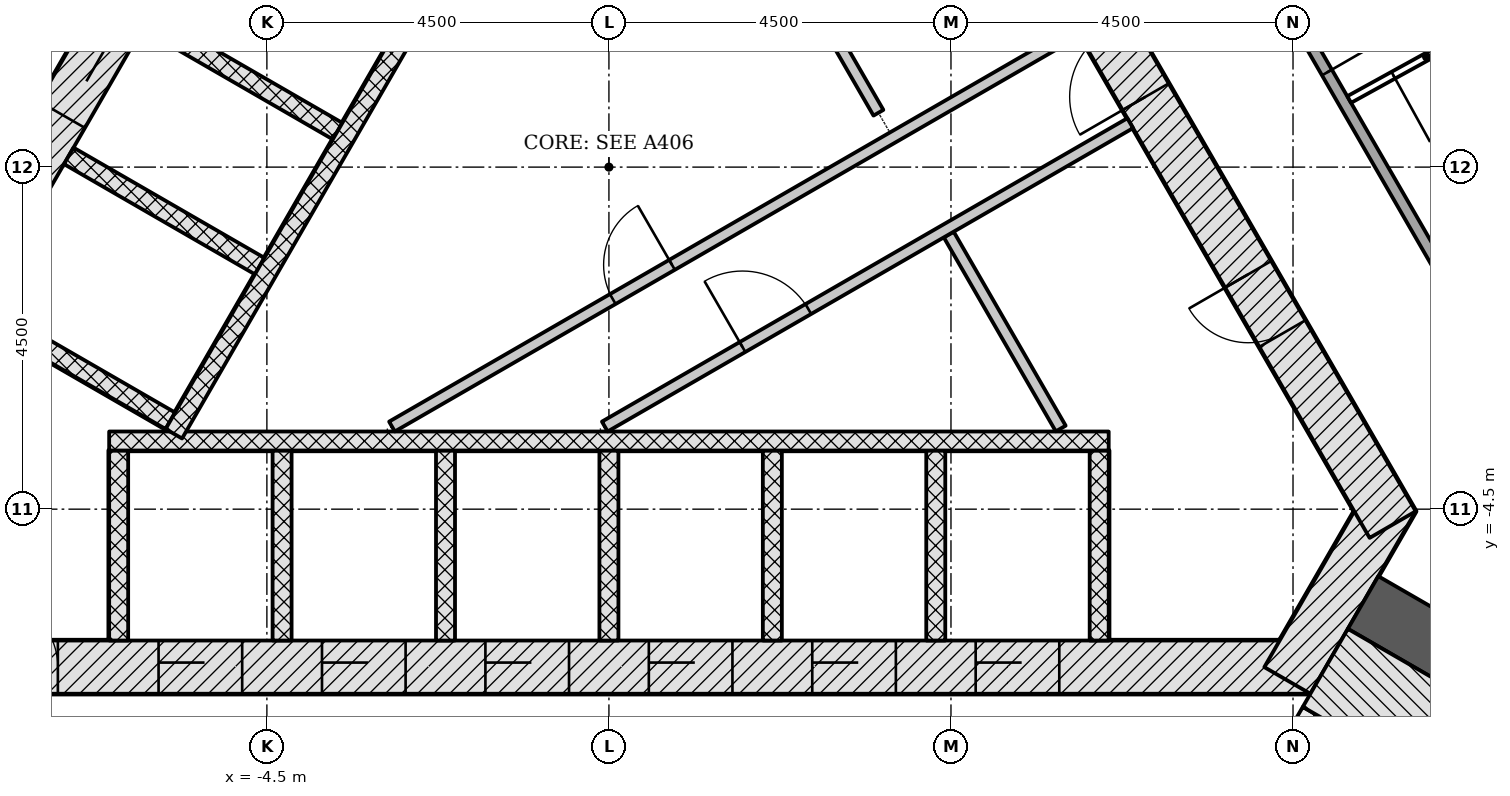
"""IFC4 building model, lengths in metres.
Left out: names, types, materials, properties, quantities, classifications, styles, units other than length and angle.
Written with IfcOpenShell. Run it as: python <this file> out.ifc"""

import sys

from ifc_helpers import new_model, si_unit, direction, frame, frame_2d, origin, place, context, subcontext, project, spatial, rectangle, extrude, element, fill, save


model = new_model("IFC4")
c1 = context("Model", 3, precision=1e-05, world=origin(), true_north=direction((0.0, 1.0)))
c2 = subcontext(c1, "Body", "Model", "MODEL_VIEW")
j1 = project(units=[si_unit("LENGTHUNIT", "METRE"), si_unit("PLANEANGLEUNIT", "RADIAN")], contexts=[c1])
p1 = place(None, origin())
s1 = spatial("IfcSite", under=j1, at=p1, CompositionType="ELEMENT")
p2 = place(p1, origin())
s2 = spatial("IfcBuilding", under=s1, at=p2, CompositionType="ELEMENT")
p3 = place(p2, frame((0.0, 0.0, 98.7)))
s3 = spatial("IfcBuildingStorey", under=s2, at=p3, CompositionType="ELEMENT", Elevation=98.7)
p4 = place(p3, frame((-9.229, -6.578, -0.2), z_axis=(0.0, 0.0, 1.0), x_axis=(1.0, 0.0, 0.0)))
e1 = element("IfcWall", 1, at=p4, inside=s3, PredefinedType="SHEAR", context=c2, shape_type="SweptSolid", body=[
    extrude(rectangle(XDim=18.458, YDim=0.7, at=frame_2d((9.229, 0.0))), origin(), (0.0, 0.0, 1.0), 3.6),
])
p5 = place(p4, frame((3.304, 0.0, 0.2)))
e2 = element("IfcOpeningElement", 2, at=p5, cuts=e1, PredefinedType="OPENING", context=c2, shape_type="SweptSolid", body=[
    extrude(rectangle(XDim=1.1, YDim=2.1, at=frame_2d((0.55, 1.05))), frame((0.0, 0.36, 0.0), z_axis=(0.0, -1.0, 0.0), x_axis=(1.0, 0.0, 0.0)), (0.0, 0.0, 1.0), 0.72),
])
p6 = place(p4, frame((5.454, 0.0, 0.2)))
e3 = element("IfcOpeningElement", 3, at=p6, cuts=e1, PredefinedType="OPENING", context=c2, shape_type="SweptSolid", body=[
    extrude(rectangle(XDim=1.1, YDim=2.1, at=frame_2d((0.55, 1.05))), frame((0.0, 0.36, 0.0), z_axis=(0.0, -1.0, 0.0), x_axis=(1.0, 0.0, 0.0)), (0.0, 0.0, 1.0), 0.72),
])
p7 = place(p4, frame((7.604, 0.0, 0.2)))
e4 = element("IfcOpeningElement", 4, at=p7, cuts=e1, PredefinedType="OPENING", context=c2, shape_type="SweptSolid", body=[
    extrude(rectangle(XDim=1.1, YDim=2.1, at=frame_2d((0.55, 1.05))), frame((0.0, 0.36, 0.0), z_axis=(0.0, -1.0, 0.0), x_axis=(1.0, 0.0, 0.0)), (0.0, 0.0, 1.0), 0.72),
])
p8 = place(p4, frame((9.754, 0.0, 0.2)))
e5 = element("IfcOpeningElement", 5, at=p8, cuts=e1, PredefinedType="OPENING", context=c2, shape_type="SweptSolid", body=[
    extrude(rectangle(XDim=1.1, YDim=2.1, at=frame_2d((0.55, 1.05))), frame((0.0, 0.36, 0.0), z_axis=(0.0, -1.0, 0.0), x_axis=(1.0, 0.0, 0.0)), (0.0, 0.0, 1.0), 0.72),
])
p9 = place(p4, frame((11.904, 0.0, 0.2)))
e6 = element("IfcOpeningElement", 6, at=p9, cuts=e1, PredefinedType="OPENING", context=c2, shape_type="SweptSolid", body=[
    extrude(rectangle(XDim=1.1, YDim=2.1, at=frame_2d((0.55, 1.05))), frame((0.0, 0.36, 0.0), z_axis=(0.0, -1.0, 0.0), x_axis=(1.0, 0.0, 0.0)), (0.0, 0.0, 1.0), 0.72),
])
p10 = place(p4, frame((14.054, 0.0, 0.2)))
e7 = element("IfcOpeningElement", 7, at=p10, cuts=e1, PredefinedType="OPENING", context=c2, shape_type="SweptSolid", body=[
    extrude(rectangle(XDim=1.1, YDim=2.1, at=frame_2d((0.55, 1.05))), frame((0.0, 0.36, 0.0), z_axis=(0.0, -1.0, 0.0), x_axis=(1.0, 0.0, 0.0)), (0.0, 0.0, 1.0), 0.72),
])
p11 = place(p4, frame((1.079, 0.0, 0.2)))
e8 = element("IfcOpeningElement", 8, at=p11, cuts=e1, PredefinedType="OPENING", context=c2, shape_type="SweptSolid", body=[
    extrude(rectangle(XDim=0.9, YDim=2.1, at=frame_2d((0.45, 1.05))), frame((0.0, 0.36, 0.0), z_axis=(0.0, -1.0, 0.0), x_axis=(1.0, 0.0, 0.0)), (0.0, 0.0, 1.0), 0.72),
])
p12 = place(p3, frame((8.926, -6.753, -0.2), z_axis=(0.0, 0.0, 1.0), x_axis=(0.500042739161, 0.866000726912, 0.0)))
e9 = element("IfcWall", 9, at=p12, inside=s3, PredefinedType="SHEAR", context=c2, shape_type="SweptSolid", body=[
    extrude(rectangle(XDim=2.771, YDim=0.7, at=frame_2d((1.386, 0.0))), origin(), (0.0, 0.0, 1.0), 3.6),
])
p13 = place(p3, frame((10.311, -4.703, -0.2), z_axis=(0.0, 0.0, 1.0), x_axis=(-0.500001446645, 0.866024568562, 0.0)))
e10 = element("IfcWall", 10, at=p13, inside=s3, PredefinedType="SHEAR", context=c2, shape_type="SweptSolid", body=[
    extrude(rectangle(XDim=18.458, YDim=0.7, at=frame_2d((9.229, 0.0))), origin(), (0.0, 0.0, 1.0), 3.6),
])
p14 = place(p13, frame((6.5, 0.0, 0.2)))
e11 = element("IfcOpeningElement", 11, at=p14, cuts=e10, PredefinedType="OPENING", context=c2, shape_type="SweptSolid", body=[
    extrude(rectangle(XDim=1.0, YDim=2.1, at=frame_2d((0.5, 1.05))), frame((0.0, 0.36, 0.0), z_axis=(0.0, -1.0, 0.0), x_axis=(1.0, 0.0, 0.0)), (0.0, 0.0, 1.0), 0.72),
])
p15 = place(p13, frame((2.902, 0.0, 0.2)))
e12 = element("IfcOpeningElement", 12, at=p15, cuts=e10, PredefinedType="OPENING", context=c2, shape_type="SweptSolid", body=[
    extrude(rectangle(XDim=0.9, YDim=2.1, at=frame_2d((0.45, 1.05))), frame((0.0, 0.36, 0.0), z_axis=(0.0, -1.0, 0.0), x_axis=(1.0, 0.0, 0.0)), (0.0, 0.0, 1.0), 0.72),
])
p16 = place(p13, frame((8.75, 0.0, 0.2)))
e13 = element("IfcOpeningElement", 13, at=p16, cuts=e10, PredefinedType="OPENING", context=c2, shape_type="SweptSolid", body=[
    extrude(rectangle(XDim=1.0, YDim=2.1, at=frame_2d((0.5, 1.05))), frame((0.0, 0.36, 0.0), z_axis=(0.0, -1.0, 0.0), x_axis=(1.0, 0.0, 0.0)), (0.0, 0.0, 1.0), 0.72),
])
p17 = place(p13, frame((13.977, 0.0, 0.2)))
e14 = element("IfcOpeningElement", 14, at=p17, cuts=e10, PredefinedType="OPENING", context=c2, shape_type="SweptSolid", body=[
    extrude(rectangle(XDim=0.9, YDim=2.1, at=frame_2d((0.45, 1.05))), frame((0.0, 0.36, 0.0), z_axis=(0.0, -1.0, 0.0), x_axis=(1.0, 0.0, 0.0)), (0.0, 0.0, 1.0), 0.72),
])
p18 = place(p3, frame((-1.083, 11.281, -0.2), z_axis=(0.0, 0.0, 1.0), x_axis=(-0.500001446645, -0.866024568562, 0.0)))
e15 = element("IfcWall", 15, at=p18, inside=s3, PredefinedType="SHEAR", context=c2, shape_type="SweptSolid", body=[
    extrude(rectangle(XDim=18.458, YDim=0.7, at=frame_2d((9.229, 0.0))), origin(), (0.0, 0.0, 1.0), 3.6),
])
p19 = place(p18, frame((8.979, 0.0, 0.2)))
e16 = element("IfcOpeningElement", 16, at=p19, cuts=e15, PredefinedType="OPENING", context=c2, shape_type="SweptSolid", body=[
    extrude(rectangle(XDim=1.2, YDim=2.1, at=frame_2d((0.6, 1.05))), frame((0.0, 0.36, 0.0), z_axis=(0.0, -1.0, 0.0), x_axis=(1.0, 0.0, 0.0)), (0.0, 0.0, 1.0), 0.72),
])
p20 = place(p18, frame((11.029, 0.0, 0.2)))
e17 = element("IfcOpeningElement", 17, at=p20, cuts=e15, PredefinedType="OPENING", context=c2, shape_type="SweptSolid", body=[
    extrude(rectangle(XDim=1.2, YDim=2.1, at=frame_2d((0.6, 1.05))), frame((0.0, 0.36, 0.0), z_axis=(0.0, -1.0, 0.0), x_axis=(1.0, 0.0, 0.0)), (0.0, 0.0, 1.0), 0.72),
])
p21 = place(p3, frame((9.922, -5.728, -0.2), z_axis=(0.0, 0.0, 1.0), x_axis=(0.866029086277, -0.499993621681, 0.0)))
e18 = element("IfcWall", 18, at=p21, inside=s3, PredefinedType="SHEAR", context=c2, shape_type="SweptSolid", body=[
    extrude(rectangle(XDim=12.677, YDim=0.8, at=frame_2d((6.339, 0.0))), origin(), (0.0, 0.0, 1.0), 3.6),
])
for number, where, z_axis, x_axis in (
    (19, (-6.45, -6.228, -0.2), (0.0, 0.0, 1.0), (0.0, 1.0, 0.0)),
    (20, (-4.3, -6.228, -0.2), (0.0, 0.0, 1.0), (0.0, 1.0, 0.0)),
    (21, (-2.15, -6.228, -0.2), (0.0, 0.0, 1.0), (0.0, 1.0, 0.0)),
    (22, (0.0, -6.228, -0.2), (0.0, 0.0, 1.0), (0.0, 1.0, 0.0)),
    (23, (2.15, -6.228, -0.2), (0.0, 0.0, 1.0), (0.0, 1.0, 0.0)),
    (24, (4.3, -6.228, -0.2), (0.0, 0.0, 1.0), (0.0, 1.0, 0.0)),
    (25, (6.45, -6.228, -0.2), (0.0, 0.0, 1.0), (0.0, 1.0, 0.0)),
):
    element("IfcWall", number, at=place(p3, frame(where, z_axis=z_axis, x_axis=x_axis)), inside=s3, PredefinedType="PARTITIONING", context=c2, shape_type="SweptSolid", body=[
        extrude(rectangle(XDim=2.5, YDim=0.25, at=frame_2d((1.25, 0.0))), origin(), (0.0, 0.0, 1.0), 3.6),
    ])
p22 = place(p3, frame((-6.575, -3.603, 0.0), z_axis=(0.0, 0.0, 1.0), x_axis=(1.0, 0.0, 0.0)))
e26 = element("IfcWall", 26, at=p22, inside=s3, PredefinedType="PARTITIONING", context=c2, shape_type="SweptSolid", body=[
    extrude(rectangle(XDim=13.15, YDim=0.25, at=frame_2d((6.575, 0.0))), origin(), (0.0, 0.0, 1.0), 3.4),
])
for number, where, z_axis, x_axis in (
    (27, (-6.081, 1.923, -0.2), (0.0, 0.0, 1.0), (0.866, -0.5, 0.0)),
    (28, (-7.106, 0.148, -0.2), (0.0, 0.0, 1.0), (0.866, -0.5, 0.0)),
    (29, (-8.281, -1.887, -0.2), (0.0, 0.0, 1.0), (0.866, -0.5, 0.0)),
):
    element("IfcWall", number, at=place(p3, frame(where, z_axis=z_axis, x_axis=x_axis)), inside=s3, PredefinedType="PARTITIONING", context=c2, shape_type="SweptSolid", body=[
        extrude(rectangle(XDim=2.9, YDim=0.25, at=frame_2d((1.45, 0.0))), origin(), (0.0, 0.0, 1.0), 3.6),
    ])
p23 = place(p3, frame((0.176, 6.711, 0.0), z_axis=(0.0, 0.0, 1.0), x_axis=(-0.500004227369, -0.866022963098, 0.0)))
e30 = element("IfcWall", 30, at=p23, inside=s3, PredefinedType="PARTITIONING", context=c2, shape_type="SweptSolid", body=[
    extrude(rectangle(XDim=11.8, YDim=0.25, at=frame_2d((5.9, 0.0))), origin(), (0.0, 0.0, 1.0), 3.4),
])
p24 = place(p3, frame((-2.854, -3.413, 0.0), z_axis=(0.0, 0.0, 1.0), x_axis=(0.866030102318, 0.499991861813, 0.0)))
e31 = element("IfcWall", 31, at=p24, inside=s3, PredefinedType="PARTITIONING", context=c2, shape_type="SweptSolid", body=[
    extrude(rectangle(XDim=10.407, YDim=0.15, at=frame_2d((5.204, 0.0))), origin(), (0.0, 0.0, 1.0), 3.4),
])
p25 = place(p24, frame((3.354, 0.0, 0.0)))
e32 = element("IfcOpeningElement", 32, at=p25, cuts=e31, PredefinedType="OPENING", context=c2, shape_type="SweptSolid", body=[
    extrude(rectangle(XDim=0.9, YDim=2.1, at=frame_2d((0.45, 1.05))), frame((0.0, 0.085, 0.0), z_axis=(0.0, -1.0, 0.0), x_axis=(1.0, 0.0, 0.0)), (0.0, 0.0, 1.0), 0.17),
])
p26 = place(p3, frame((5.944, -3.439, 0.0), z_axis=(0.0, 0.0, 1.0), x_axis=(-0.499997367627, 0.86602692358, 0.0)))
e33 = element("IfcWall", 33, at=p26, inside=s3, PredefinedType="PARTITIONING", context=c2, shape_type="SweptSolid", body=[
    extrude(rectangle(XDim=2.947, YDim=0.15, at=frame_2d((1.473, 0.0))), origin(), (0.0, 0.0, 1.0), 3.4),
])
p27 = place(p3, frame((-0.054, -3.413, 0.0), z_axis=(0.0, 0.0, 1.0), x_axis=(0.866026668906, 0.499997808738, 0.0)))
e34 = element("IfcWall", 34, at=p27, inside=s3, PredefinedType="PARTITIONING", context=c2, shape_type="SweptSolid", body=[
    extrude(rectangle(XDim=7.982, YDim=0.15, at=frame_2d((3.991, 0.0))), origin(), (0.0, 0.0, 1.0), 3.4),
])
p28 = place(p27, frame((2.092, 0.0, 0.0)))
e35 = element("IfcOpeningElement", 35, at=p28, cuts=e34, PredefinedType="OPENING", context=c2, shape_type="SweptSolid", body=[
    extrude(rectangle(XDim=1.0, YDim=2.1, at=frame_2d((0.5, 1.05))), frame((0.0, 0.085, 0.0), z_axis=(0.0, -1.0, 0.0), x_axis=(1.0, 0.0, 0.0)), (0.0, 0.0, 1.0), 0.17),
])
p29 = place(p3, frame((3.546, 0.715, 0.0), z_axis=(0.0, 0.0, 1.0), x_axis=(-0.50002895357, 0.866008686788, 0.0)))
e36 = element("IfcWall", 36, at=p29, inside=s3, PredefinedType="PARTITIONING", context=c2, shape_type="SweptSolid", body=[
    extrude(rectangle(XDim=6.642, YDim=0.15, at=frame_2d((3.321, 0.0))), origin(), (0.0, 0.0, 1.0), 3.4),
])
p30 = place(p3, frame((7.44, -10.226, -0.2), z_axis=(0.0, 0.0, 1.0), x_axis=(0.500022077904, 0.866012656725, 0.0)))
e37 = element("IfcWall", 37, at=p30, inside=s3, PredefinedType="SHEAR", context=c2, shape_type="SweptSolid", body=[
    extrude(rectangle(XDim=3.55, YDim=0.2, at=frame_2d((1.775, 0.0))), origin(), (0.0, 0.0, 1.0), 3.6),
])
p31 = place(p30, frame((1.175, 0.0, 0.2)))
e38 = element("IfcOpeningElement", 38, at=p31, cuts=e37, PredefinedType="OPENING", context=c2, shape_type="SweptSolid", body=[
    extrude(rectangle(XDim=1.2, YDim=2.1, at=frame_2d((0.6, 1.05))), frame((0.0, 0.11, 0.0), z_axis=(0.0, -1.0, 0.0), x_axis=(1.0, 0.0, 0.0)), (0.0, 0.0, 1.0), 0.22),
])
p32 = place(p3, frame((9.425, -6.588, -0.2), z_axis=(0.0, 0.0, 1.0), x_axis=(0.866018442252, -0.500012057535, 0.0)))
e39 = element("IfcWall", 39, at=p32, inside=s3, PredefinedType="SHEAR", context=c2, shape_type="SweptSolid", body=[
    extrude(rectangle(XDim=7.2, YDim=1.186, at=frame_2d((3.6, 0.0))), origin(), (0.0, 0.0, 1.0), 3.6),
])
p33 = place(p3, frame((-16.169, -3.099, 0.0), z_axis=(0.0, 0.0, 1.0), x_axis=(0.499999805269, 0.866025516212, 0.0)))
e40 = element("IfcWall", 40, at=p33, inside=s3, PredefinedType="PARTITIONING", context=c2, shape_type="SweptSolid", body=[
    extrude(rectangle(XDim=22.097, YDim=0.15, at=frame_2d((11.049, 0.0))), origin(), (0.0, 0.0, 1.0), 2.778),
])
p34 = place(p33, frame((16.878, 0.0, 0.0)))
e41 = element("IfcOpeningElement", 41, at=p34, cuts=e40, PredefinedType="OPENING", context=c2, shape_type="SweptSolid", body=[
    extrude(rectangle(XDim=1.0, YDim=2.1, at=frame_2d((0.5, 1.05))), frame((0.0, 0.085, 0.0), z_axis=(0.0, -1.0, 0.0), x_axis=(1.0, 0.0, 0.0)), (0.0, 0.0, 1.0), 0.17),
])
p35 = place(p33, frame((7.816, 0.0, 0.0)))
e42 = element("IfcOpeningElement", 42, at=p35, cuts=e40, PredefinedType="OPENING", context=c2, shape_type="SweptSolid", body=[
    extrude(rectangle(XDim=1.5, YDim=2.1, at=frame_2d((0.75, 1.05))), frame((0.0, 0.085, 0.0), z_axis=(0.0, -1.0, 0.0), x_axis=(1.0, 0.0, 0.0)), (0.0, 0.0, 1.0), 0.17),
])
p36 = place(p33, frame((1.2, 0.0, 0.0)))
e43 = element("IfcOpeningElement", 43, at=p36, cuts=e40, PredefinedType="OPENING", context=c2, shape_type="SweptSolid", body=[
    extrude(rectangle(XDim=1.5, YDim=2.1, at=frame_2d((0.75, 1.05))), frame((0.0, 0.085, 0.0), z_axis=(0.0, -1.0, 0.0), x_axis=(1.0, 0.0, 0.0)), (0.0, 0.0, 1.0), 0.17),
])
p37 = place(p3, frame((-4.407, 13.374, 0.0), z_axis=(0.0, 0.0, 1.0), x_axis=(-0.499997181693, -0.866027030928, 0.0)))
e44 = element("IfcWall", 44, at=p37, inside=s3, PredefinedType="PARTITIONING", context=c2, shape_type="SweptSolid", body=[
    extrude(rectangle(XDim=16.77, YDim=0.15, at=frame_2d((8.385, 0.0))), origin(), (0.0, 0.0, 1.0), 2.778),
])
p38 = place(p37, frame((8.879, 0.0, 0.0)))
e45 = element("IfcOpeningElement", 45, at=p38, cuts=e44, PredefinedType="OPENING", context=c2, shape_type="SweptSolid", body=[
    extrude(rectangle(XDim=1.0, YDim=2.1, at=frame_2d((0.5, 1.05))), frame((0.0, 0.085, 0.0), z_axis=(0.0, -1.0, 0.0), x_axis=(1.0, 0.0, 0.0)), (0.0, 0.0, 1.0), 0.17),
])
p39 = place(p3, frame((5.289, 8.446, 0.0), z_axis=(0.0, 0.0, 1.0), x_axis=(0.499996620721, -0.866027354803, 0.0)))
e46 = element("IfcWall", 46, at=p39, inside=s3, PredefinedType="PARTITIONING", context=c2, shape_type="SweptSolid", body=[
    extrude(rectangle(XDim=15.057, YDim=0.15, at=frame_2d((7.528, 0.0))), origin(), (0.0, 0.0, 1.0), 2.778),
])
p40 = place(p39, frame((12.566, 0.0, 0.0)))
e47 = element("IfcOpeningElement", 47, at=p40, cuts=e46, PredefinedType="OPENING", context=c2, shape_type="SweptSolid", body=[
    extrude(rectangle(XDim=1.0, YDim=2.1, at=frame_2d((0.5, 1.05))), frame((0.0, 0.085, 0.0), z_axis=(0.0, -1.0, 0.0), x_axis=(1.0, 0.0, 0.0)), (0.0, 0.0, 1.0), 0.17),
])
p41 = place(p39, frame((7.316, 0.0, 0.0)))
e48 = element("IfcOpeningElement", 48, at=p41, cuts=e46, PredefinedType="OPENING", context=c2, shape_type="SweptSolid", body=[
    extrude(rectangle(XDim=1.0, YDim=2.1, at=frame_2d((0.5, 1.05))), frame((0.0, 0.085, 0.0), z_axis=(0.0, -1.0, 0.0), x_axis=(1.0, 0.0, 0.0)), (0.0, 0.0, 1.0), 0.17),
])
p42 = place(p39, frame((5.357, 0.0, 0.0)))
e49 = element("IfcOpeningElement", 49, at=p42, cuts=e46, PredefinedType="OPENING", context=c2, shape_type="SweptSolid", body=[
    extrude(rectangle(XDim=1.0, YDim=2.1, at=frame_2d((0.5, 1.05))), frame((0.0, 0.085, 0.0), z_axis=(0.0, -1.0, 0.0), x_axis=(1.0, 0.0, 0.0)), (0.0, 0.0, 1.0), 0.17),
])
p43 = place(p3, frame((11.808, 2.03, 0.0), z_axis=(0.0, 0.0, 1.0), x_axis=(-0.875678647011, -0.482894302275, 0.0)))
e50 = element("IfcWall", 50, at=p43, inside=s3, PredefinedType="PARTITIONING", context=c2, shape_type="SweptSolid", body=[
    extrude(rectangle(XDim=2.363, YDim=0.1, at=frame_2d((1.181, 0.0))), origin(), (0.0, 0.0, 1.0), 3.4),
])
p44 = place(p43, frame((0.7, 0.0, 0.0)))
e51 = element("IfcOpeningElement", 51, at=p44, cuts=e50, PredefinedType="OPENING", context=c2, shape_type="SweptSolid", body=[
    extrude(rectangle(XDim=1.0, YDim=2.1, at=frame_2d((0.5, 1.05))), frame((0.0, 0.06, 0.0), z_axis=(0.0, -1.0, 0.0), x_axis=(1.0, 0.0, 0.0)), (0.0, 0.0, 1.0), 0.12),
])
p45 = place(p5, origin())
e52 = element("IfcDoor", 52, at=p45, inside=s3, OperationType="DOUBLE_DOOR_SLIDING", PredefinedType="DOOR", context=c2, shape_type="SweptSolid", body=[
    extrude(rectangle(XDim=1.1, YDim=2.1, at=frame_2d((0.55, 1.05))), frame((0.0, 0.025, 0.0), z_axis=(0.0, -1.0, 0.0), x_axis=(1.0, 0.0, 0.0)), (0.0, 0.0, 1.0), 0.05),
])
fill(e2, e52)
p46 = place(p6, origin())
e53 = element("IfcDoor", 53, at=p46, inside=s3, OperationType="DOUBLE_DOOR_SLIDING", PredefinedType="DOOR", context=c2, shape_type="SweptSolid", body=[
    extrude(rectangle(XDim=1.1, YDim=2.1, at=frame_2d((0.55, 1.05))), frame((0.0, 0.025, 0.0), z_axis=(0.0, -1.0, 0.0), x_axis=(1.0, 0.0, 0.0)), (0.0, 0.0, 1.0), 0.05),
])
fill(e3, e53)
p47 = place(p7, origin())
e54 = element("IfcDoor", 54, at=p47, inside=s3, OperationType="DOUBLE_DOOR_SLIDING", PredefinedType="DOOR", context=c2, shape_type="SweptSolid", body=[
    extrude(rectangle(XDim=1.1, YDim=2.1, at=frame_2d((0.55, 1.05))), frame((0.0, 0.025, 0.0), z_axis=(0.0, -1.0, 0.0), x_axis=(1.0, 0.0, 0.0)), (0.0, 0.0, 1.0), 0.05),
])
fill(e4, e54)
p48 = place(p8, origin())
e55 = element("IfcDoor", 55, at=p48, inside=s3, OperationType="DOUBLE_DOOR_SLIDING", PredefinedType="DOOR", context=c2, shape_type="SweptSolid", body=[
    extrude(rectangle(XDim=1.1, YDim=2.1, at=frame_2d((0.55, 1.05))), frame((0.0, 0.025, 0.0), z_axis=(0.0, -1.0, 0.0), x_axis=(1.0, 0.0, 0.0)), (0.0, 0.0, 1.0), 0.05),
])
fill(e5, e55)
p49 = place(p9, origin())
e56 = element("IfcDoor", 56, at=p49, inside=s3, OperationType="DOUBLE_DOOR_SLIDING", PredefinedType="DOOR", context=c2, shape_type="SweptSolid", body=[
    extrude(rectangle(XDim=1.1, YDim=2.1, at=frame_2d((0.55, 1.05))), frame((0.0, 0.025, 0.0), z_axis=(0.0, -1.0, 0.0), x_axis=(1.0, 0.0, 0.0)), (0.0, 0.0, 1.0), 0.05),
])
fill(e6, e56)
p50 = place(p10, origin())
e57 = element("IfcDoor", 57, at=p50, inside=s3, OperationType="DOUBLE_DOOR_SLIDING", PredefinedType="DOOR", context=c2, shape_type="SweptSolid", body=[
    extrude(rectangle(XDim=1.1, YDim=2.1, at=frame_2d((0.55, 1.05))), frame((0.0, 0.025, 0.0), z_axis=(0.0, -1.0, 0.0), x_axis=(1.0, 0.0, 0.0)), (0.0, 0.0, 1.0), 0.05),
])
fill(e7, e57)
p51 = place(p20, origin())
e58 = element("IfcDoor", 58, at=p51, inside=s3, OperationType="DOUBLE_DOOR_SLIDING", PredefinedType="DOOR", context=c2, shape_type="SweptSolid", body=[
    extrude(rectangle(XDim=1.2, YDim=2.1, at=frame_2d((0.6, 1.05))), frame((0.0, 0.025, 0.0), z_axis=(0.0, -1.0, 0.0), x_axis=(1.0, 0.0, 0.0)), (0.0, 0.0, 1.0), 0.05),
])
fill(e17, e58)
p52 = place(p14, origin())
e59 = element("IfcDoor", 59, at=p52, inside=s3, OperationType="SINGLE_SWING_LEFT", PredefinedType="DOOR", context=c2, shape_type="SweptSolid", body=[
    extrude(rectangle(XDim=1.0, YDim=2.1, at=frame_2d((0.5, 1.05))), frame((0.0, 0.075, 0.0), z_axis=(0.0, -1.0, 0.0), x_axis=(1.0, 0.0, 0.0)), (0.0, 0.0, 1.0), 0.15),
])
fill(e11, e59)
p53 = place(p15, origin())
e60 = element("IfcDoor", 60, at=p53, inside=s3, OperationType="SINGLE_SWING_RIGHT", PredefinedType="DOOR", context=c2, shape_type="SweptSolid", body=[
    extrude(rectangle(XDim=0.9, YDim=2.1, at=frame_2d((0.45, 1.05))), frame((0.0, 0.075, 0.0), z_axis=(0.0, -1.0, 0.0), x_axis=(1.0, 0.0, 0.0)), (0.0, 0.0, 1.0), 0.15),
])
fill(e12, e60)
p54 = place(p28, origin())
e61 = element("IfcDoor", 61, at=p54, inside=s3, OperationType="SINGLE_SWING_LEFT", PredefinedType="DOOR", context=c2, shape_type="SweptSolid", body=[
    extrude(rectangle(XDim=1.0, YDim=2.1, at=frame_2d((0.5, 1.05))), frame((0.0, 0.025, 0.0), z_axis=(0.0, -1.0, 0.0), x_axis=(1.0, 0.0, 0.0)), (0.0, 0.0, 1.0), 0.05),
])
fill(e35, e61)
p55 = place(p25, origin())
e62 = element("IfcDoor", 62, at=p55, inside=s3, OperationType="SINGLE_SWING_RIGHT", PredefinedType="DOOR", context=c2, shape_type="SweptSolid", body=[
    extrude(rectangle(XDim=0.9, YDim=2.1, at=frame_2d((0.45, 1.05))), frame((0.0, 0.025, 0.0), z_axis=(0.0, -1.0, 0.0), x_axis=(1.0, 0.0, 0.0)), (0.0, 0.0, 1.0), 0.05),
])
fill(e32, e62)
p56 = place(p11, origin())
e63 = element("IfcDoor", 63, at=p56, inside=s3, OperationType="SINGLE_SWING_LEFT", PredefinedType="DOOR", context=c2, shape_type="SweptSolid", body=[
    extrude(rectangle(XDim=0.9, YDim=2.1, at=frame_2d((0.45, 1.05))), frame((0.0, 0.075, 0.0), z_axis=(0.0, -1.0, 0.0), x_axis=(1.0, 0.0, 0.0)), (0.0, 0.0, 1.0), 0.15),
])
fill(e8, e63)
p57 = place(p41, origin())
e64 = element("IfcDoor", 64, at=p57, inside=s3, OperationType="SINGLE_SWING_RIGHT", PredefinedType="DOOR", context=c2, shape_type="SweptSolid", body=[
    extrude(rectangle(XDim=1.0, YDim=2.1, at=frame_2d((0.5, 1.05))), frame((0.0, 0.025, 0.0), z_axis=(0.0, -1.0, 0.0), x_axis=(1.0, 0.0, 0.0)), (0.0, 0.0, 1.0), 0.05),
])
fill(e48, e64)
p58 = place(p44, origin())
e65 = element("IfcDoor", 65, at=p58, inside=s3, OperationType="SINGLE_SWING_RIGHT", PredefinedType="DOOR", context=c2, shape_type="SweptSolid", body=[
    extrude(rectangle(XDim=1.0, YDim=2.1, at=frame_2d((0.5, 1.05))), frame((0.0, 0.025, 0.0), z_axis=(0.0, -1.0, 0.0), x_axis=(1.0, 0.0, 0.0)), (0.0, 0.0, 1.0), 0.05),
])
fill(e51, e65)
save(model, sys.argv[1])
